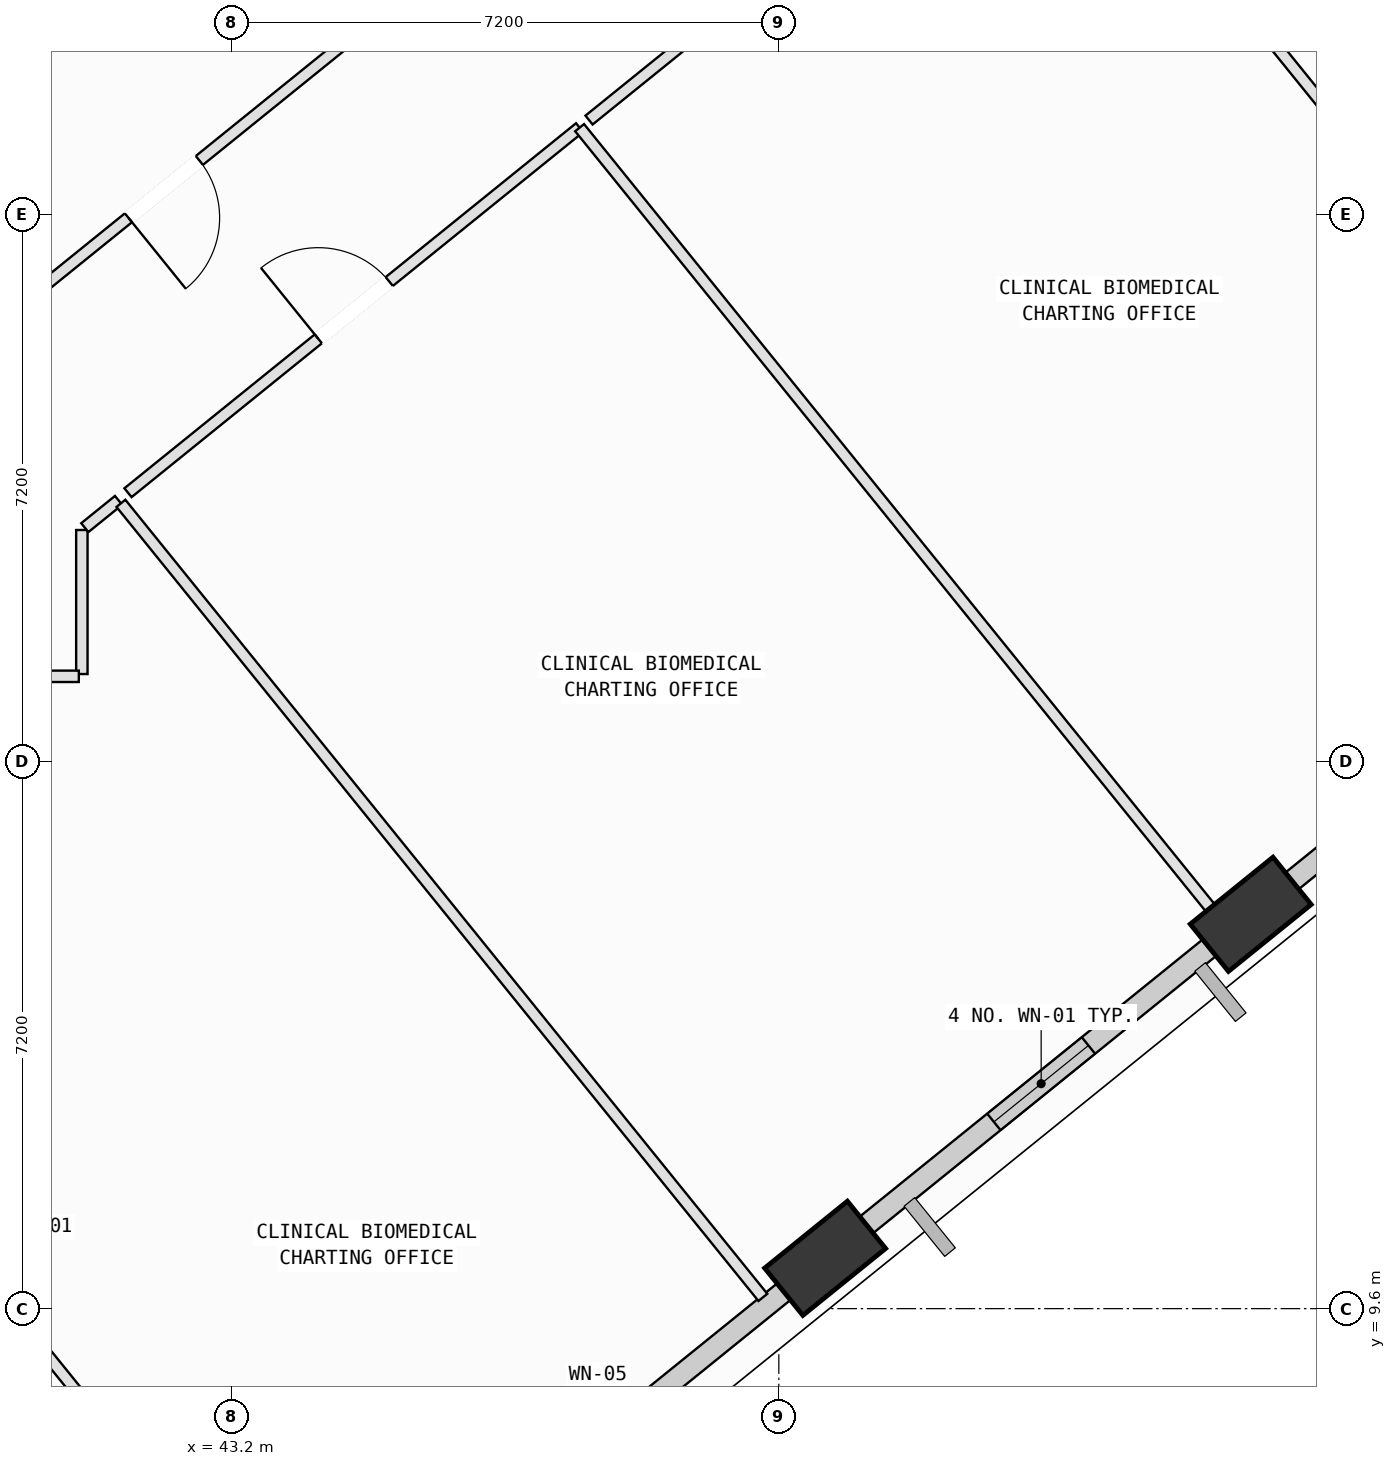
"""IFC4 building model, lengths in metres.
Left out: names, types, materials, properties, quantities, classifications, styles, units other than length and angle.
Written with IfcOpenShell. Run it as: python <this file> out.ifc"""

import sys

from ifc_helpers import new_model, si_unit, direction, frame, frame_2d, origin, origin_2d, place, context, subcontext, project, spatial, rectangle, extrude, element, fill, save


model = new_model("IFC4")
c1 = context("Model", 3, precision=1e-05, world=origin(), true_north=direction((0.0, 1.0)))
c2 = subcontext(c1, "Body", "Model", "MODEL_VIEW")
j1 = project(units=[si_unit("LENGTHUNIT", "METRE"), si_unit("PLANEANGLEUNIT", "RADIAN")], contexts=[c1])
p1 = place(None, origin())
s1 = spatial("IfcSite", under=j1, at=p1, CompositionType="ELEMENT")
p2 = place(p1, origin())
s2 = spatial("IfcBuilding", under=s1, at=p2, CompositionType="ELEMENT")
p3 = place(p2, frame((0.0, 0.0, 189.8)))
s3 = spatial("IfcBuildingStorey", under=s2, at=p3, CompositionType="ELEMENT", Elevation=189.8)
p4 = place(p3, frame((51.009, 10.262, 0.002), z_axis=(0.059363348955, 0.072318669987, 0.995613380169), x_axis=(-0.998222050572, 0.009656049796, 0.058817501262)))
e1 = element("IfcColumn", 1, at=p4, inside=s3, PredefinedType="COLUMN", context=c2, shape_type="SweptSolid", body=[
    extrude(rectangle(XDim=1.4, YDim=0.8, at=origin_2d()), origin(), (0.0, 0.0, 1.0), 4.014),
])
p5 = place(p3, frame((56.609, 14.789, 0.002), z_axis=(0.040468561583, 0.095155806966, 0.994639466301), x_axis=(-0.960371938901, -0.271035474756, 0.065003926005)))
e2 = element("IfcColumn", 2, at=p5, inside=s3, PredefinedType="COLUMN", context=c2, shape_type="SweptSolid", body=[
    extrude(rectangle(XDim=1.4, YDim=0.8, at=origin_2d()), origin(), (0.0, 0.0, 1.0), 4.018),
])
p6 = place(p3, frame((50.768, 10.067, 0.0), z_axis=(0.0, 0.0, 1.0), x_axis=(-0.777701603698, -0.628633609987, 0.0)))
e3 = element("IfcWall", 3, at=p6, inside=s3, PredefinedType="SOLIDWALL", context=c2, shape_type="SweptSolid", body=[
    extrude(rectangle(XDim=6.209, YDim=0.28, at=frame_2d((3.104, 0.0))), origin(), (0.0, 0.0, 1.0), 3.265),
])
p7 = place(p6, frame((2.934, 0.0, 0.75)))
e4 = element("IfcOpeningElement", 4, at=p7, cuts=e3, PredefinedType="OPENING", context=c2, shape_type="SweptSolid", body=[
    extrude(rectangle(XDim=1.2, YDim=1.75, at=frame_2d((0.6, 0.875))), frame((0.0, 0.15, 0.0), z_axis=(0.0, -1.0, 0.0), x_axis=(1.0, 0.0, 0.0)), (0.0, 0.0, 1.0), 0.3),
])
p8 = place(p3, frame((56.373, 14.598, 0.0), z_axis=(0.0, 0.0, 1.0), x_axis=(-0.77770639609, -0.628627681129, 0.0)))
e5 = element("IfcWall", 5, at=p8, inside=s3, PredefinedType="SOLIDWALL", context=c2, shape_type="SweptSolid", body=[
    extrude(rectangle(XDim=6.218, YDim=0.28, at=frame_2d((3.109, 0.0))), origin(), (0.0, 0.0, 1.0), 3.265),
])
p9 = place(p8, frame((2.442, 0.0, 0.75)))
e6 = element("IfcOpeningElement", 6, at=p9, cuts=e5, PredefinedType="OPENING", context=c2, shape_type="SweptSolid", body=[
    extrude(rectangle(XDim=1.6, YDim=1.95, at=frame_2d((0.8, 0.975))), frame((0.0, 0.15, 0.0), z_axis=(0.0, -1.0, 0.0), x_axis=(1.0, 0.0, 0.0)), (0.0, 0.0, 1.0), 0.3),
])
p10 = place(p3, frame((61.984, 19.134, 0.0), z_axis=(0.0, 0.0, 1.0), x_axis=(-0.777691861755, -0.628645661848, 0.0)))
e7 = element("IfcWall", 7, at=p10, inside=s3, PredefinedType="SOLIDWALL", context=c2, shape_type="SweptSolid", body=[
    extrude(rectangle(XDim=6.242, YDim=0.28, at=frame_2d((3.121, 0.0))), origin(), (0.0, 0.0, 1.0), 3.265),
])
p11 = place(p10, frame((0.668, 0.0, 0.75)))
e8 = element("IfcOpeningElement", 8, at=p11, cuts=e7, PredefinedType="OPENING", context=c2, shape_type="SweptSolid", body=[
    extrude(rectangle(XDim=2.0, YDim=1.95, at=frame_2d((1.0, 0.975))), frame((0.0, 0.15, 0.0), z_axis=(0.0, -1.0, 0.0), x_axis=(1.0, 0.0, 0.0)), (0.0, 0.0, 1.0), 0.3),
])
p12 = place(p3, frame((36.15, 14.71, 0.0), z_axis=(0.0, 0.0, 1.0), x_axis=(0.628634979592, -0.777700496613, 0.0)))
e9 = element("IfcWall", 9, at=p12, inside=s3, PredefinedType="PARTITIONING", context=c2, shape_type="SweptSolid", body=[
    extrude(rectangle(XDim=12.685, YDim=0.15, at=frame_2d((6.342, 0.0))), origin(), (0.0, 0.0, 1.0), 3.78),
])
p13 = place(p12, frame((5.912, 0.0, 0.0)))
e10 = element("IfcOpeningElement", 10, at=p13, cuts=e9, PredefinedType="OPENING", context=c2, shape_type="SweptSolid", body=[
    extrude(rectangle(XDim=0.86, YDim=2.06, at=frame_2d((0.43, 1.03))), frame((0.0, 0.085, 0.0), z_axis=(0.0, -1.0, 0.0), x_axis=(1.0, 0.0, 0.0)), (0.0, 0.0, 1.0), 0.17),
])
p14 = place(p3, frame((41.23, 17.95, 0.0), z_axis=(0.0, 0.0, 1.0), x_axis=(0.0, 1.0, 0.0)))
e11 = element("IfcWall", 11, at=p14, inside=s3, PredefinedType="PARTITIONING", context=c2, shape_type="SweptSolid", body=[
    extrude(rectangle(XDim=1.895, YDim=0.15, at=frame_2d((0.948, 0.0))), origin(), (0.0, 0.0, 1.0), 3.78),
])
p15 = place(p3, frame((41.269, 19.876, 0.0), z_axis=(0.0, 0.0, 1.0), x_axis=(0.777394219276, 0.629013694475, 0.0)))
e12 = element("IfcWall", 12, at=p15, inside=s3, PredefinedType="PARTITIONING", context=c2, shape_type="SweptSolid", body=[
    extrude(rectangle(XDim=0.571, YDim=0.15, at=frame_2d((0.286, 0.0))), origin(), (0.0, 0.0, 1.0), 3.065),
])
p16 = place(p3, frame((41.744, 20.196, 0.0), z_axis=(0.0, 0.0, 1.0), x_axis=(0.628664865479, -0.777676338146, 0.0)))
e13 = element("IfcWall", 13, at=p16, inside=s3, PredefinedType="PARTITIONING", context=c2, shape_type="SweptSolid", body=[
    extrude(rectangle(XDim=13.435, YDim=0.15, at=frame_2d((6.717, 0.0))), origin(), (0.0, 0.0, 1.0), 3.78),
])
p17 = place(p3, frame((38.899, 17.92, 0.0), z_axis=(0.0, 0.0, 1.0), x_axis=(1.0, 0.0, 0.0)))
e14 = element("IfcWall", 14, at=p17, inside=s3, PredefinedType="PARTITIONING", context=c2, shape_type="SweptSolid", body=[
    extrude(rectangle(XDim=2.291, YDim=0.15, at=frame_2d((1.146, 0.0))), origin(), (0.0, 0.0, 1.0), 3.78),
])
p18 = place(p3, frame((41.837, 20.336, 0.0), z_axis=(0.0, 0.0, 1.0), x_axis=(0.777713450533, 0.628618953628, 0.0)))
e15 = element("IfcWall", 15, at=p18, inside=s3, PredefinedType="PARTITIONING", context=c2, shape_type="SweptSolid", body=[
    extrude(rectangle(XDim=7.641, YDim=0.15, at=frame_2d((3.82, 0.0))), origin(), (0.0, 0.0, 1.0), 3.065),
])
p19 = place(p18, frame((3.22, 0.0, 0.0)))
e16 = element("IfcOpeningElement", 16, at=p19, cuts=e15, PredefinedType="OPENING", context=c2, shape_type="SweptSolid", body=[
    extrude(rectangle(XDim=1.2, YDim=2.15, at=frame_2d((0.6, 1.075))), frame((0.0, 0.085, 0.0), z_axis=(0.0, -1.0, 0.0), x_axis=(1.0, 0.0, 0.0)), (0.0, 0.0, 1.0), 0.17),
])
p20 = place(p3, frame((47.779, 25.139, 0.0), z_axis=(0.0, 0.0, 1.0), x_axis=(0.628603815075, -0.777725686649, 0.0)))
e17 = element("IfcWall", 17, at=p20, inside=s3, PredefinedType="PARTITIONING", context=c2, shape_type="SweptSolid", body=[
    extrude(rectangle(XDim=13.486, YDim=0.15, at=frame_2d((6.743, 0.0))), origin(), (0.0, 0.0, 1.0), 3.78),
])
p21 = place(p3, frame((51.682, 10.51, 0.0), z_axis=(0.0, 0.0, 1.0), x_axis=(-0.777778836383, -0.628538051095, 0.0)))
e18 = element("IfcWall", 18, at=p21, inside=s3, PredefinedType="PARTITIONING", context=c2, shape_type="SweptSolid", body=[
    extrude(rectangle(XDim=0.99, YDim=0.15, at=frame_2d((0.495, 0.0))), origin(), (0.0, 0.0, 1.0), 3.265),
])
p22 = place(p3, frame((47.903, 25.239, 0.0), z_axis=(0.0, 0.0, 1.0), x_axis=(0.777700823306, 0.628634575433, 0.0)))
e19 = element("IfcWall", 19, at=p22, inside=s3, PredefinedType="PARTITIONING", context=c2, shape_type="SweptSolid", body=[
    extrude(rectangle(XDim=7.64, YDim=0.15, at=frame_2d((3.82, 0.0))), origin(), (0.0, 0.0, 1.0), 3.78),
])
p23 = place(p22, frame((3.22, 0.0, 0.0)))
e20 = element("IfcOpeningElement", 20, at=p23, cuts=e19, PredefinedType="OPENING", context=c2, shape_type="SweptSolid", body=[
    extrude(rectangle(XDim=1.2, YDim=2.15, at=frame_2d((0.6, 1.075))), frame((0.0, 0.085, 0.0), z_axis=(0.0, -1.0, 0.0), x_axis=(1.0, 0.0, 0.0)), (0.0, 0.0, 1.0), 0.17),
])
p24 = place(p3, frame((53.845, 30.042, 0.0), z_axis=(0.0, 0.0, 1.0), x_axis=(0.628663319938, -0.777677587541, 0.0)))
e21 = element("IfcWall", 21, at=p24, inside=s3, PredefinedType="PARTITIONING", context=c2, shape_type="SweptSolid", body=[
    extrude(rectangle(XDim=13.83, YDim=0.15, at=frame_2d((6.915, 0.0))), origin(), (0.0, 0.0, 1.0), 3.78),
])
p25 = place(p3, frame((57.274, 15.031, 0.0), z_axis=(0.0, 0.0, 1.0), x_axis=(-0.777323313419, -0.629101316494, 0.0)))
e22 = element("IfcWall", 22, at=p25, inside=s3, PredefinedType="PARTITIONING", context=c2, shape_type="SweptSolid", body=[
    extrude(rectangle(XDim=0.87, YDim=0.15, at=frame_2d((0.435, 0.0))), origin(), (0.0, 0.0, 1.0), 3.265),
])
p26 = place(p3, frame((46.52, 27.734, 0.0), z_axis=(0.0, 0.0, 1.0), x_axis=(-0.777697805965, -0.628638308248, 0.0)))
e23 = element("IfcWall", 23, at=p26, inside=s3, PredefinedType="PARTITIONING", context=c2, shape_type="SweptSolid", body=[
    extrude(rectangle(XDim=10.828, YDim=0.15, at=frame_2d((5.414, 0.0))), origin(), (0.0, 0.0, 1.0), 3.065),
])
p27 = place(p26, frame((4.814, 0.0, 0.0)))
e24 = element("IfcOpeningElement", 24, at=p27, cuts=e23, PredefinedType="OPENING", context=c2, shape_type="SweptSolid", body=[
    extrude(rectangle(XDim=1.2, YDim=2.15, at=frame_2d((0.6, 1.075))), frame((0.0, 0.085, 0.0), z_axis=(0.0, -1.0, 0.0), x_axis=(1.0, 0.0, 0.0)), (0.0, 0.0, 1.0), 0.17),
])
p28 = place(p3, frame((34.93, 24.847, 0.0), z_axis=(0.0, 0.0, 1.0), x_axis=(0.777695693254, 0.628640921906, 0.0)))
e25 = element("IfcWall", 25, at=p28, inside=s3, PredefinedType="PARTITIONING", context=c2, shape_type="SweptSolid", body=[
    extrude(rectangle(XDim=10.828, YDim=0.15, at=frame_2d((5.414, 0.0))), origin(), (0.0, 0.0, 1.0), 3.265),
])
p29 = place(p3, frame((55.108, 31.153, 0.0), z_axis=(0.0, 0.0, 1.0), x_axis=(0.628641365164, -0.777695334951, 0.0)))
e26 = element("IfcWall", 26, at=p29, inside=s3, PredefinedType="PARTITIONING", context=c2, shape_type="SweptSolid", body=[
    extrude(rectangle(XDim=11.821, YDim=0.15, at=frame_2d((5.911, 0.0))), origin(), (0.0, 0.0, 1.0), 3.78),
])
p30 = place(p29, frame((5.48, 0.0, 0.0)))
e27 = element("IfcOpeningElement", 27, at=p30, cuts=e26, PredefinedType="OPENING", context=c2, shape_type="SweptSolid", body=[
    extrude(rectangle(XDim=0.86, YDim=2.06, at=frame_2d((0.43, 1.03))), frame((0.0, 0.085, 0.0), z_axis=(0.0, -1.0, 0.0), x_axis=(1.0, 0.0, 0.0)), (0.0, 0.0, 1.0), 0.17),
])
p31 = place(p3, frame((57.036, 32.712, 0.0), z_axis=(0.0, 0.0, 1.0), x_axis=(0.62868295639, -0.777661713308, 0.0)))
e28 = element("IfcWall", 28, at=p31, inside=s3, PredefinedType="PARTITIONING", context=c2, shape_type="SweptSolid", body=[
    extrude(rectangle(XDim=11.221, YDim=0.15, at=frame_2d((5.61, 0.0))), origin(), (0.0, 0.0, 1.0), 3.265),
])
p32 = place(p9, origin())
e29 = element("IfcWindow", 29, at=p32, inside=s3, PartitioningType="SINGLE_PANEL", PredefinedType="WINDOW", context=c2, shape_type="SweptSolid", body=[
    extrude(rectangle(XDim=1.6, YDim=1.95, at=frame_2d((0.8, 0.975))), frame((0.0, 0.03, 0.0), z_axis=(0.0, -1.0, 0.0), x_axis=(1.0, 0.0, 0.0)), (0.0, 0.0, 1.0), 0.06),
])
fill(e6, e29)
p33 = place(p19, origin())
e30 = element("IfcDoor", 30, at=p33, inside=s3, OperationType="SINGLE_SWING_LEFT", PredefinedType="DOOR", context=c2, shape_type="SweptSolid", body=[
    extrude(rectangle(XDim=1.2, YDim=2.15, at=frame_2d((0.6, 1.075))), frame((0.0, 0.025, 0.0), z_axis=(0.0, -1.0, 0.0), x_axis=(1.0, 0.0, 0.0)), (0.0, 0.0, 1.0), 0.05),
])
fill(e16, e30)
p34 = place(p27, origin())
e31 = element("IfcDoor", 31, at=p34, inside=s3, OperationType="SINGLE_SWING_RIGHT", PredefinedType="DOOR", context=c2, shape_type="SweptSolid", body=[
    extrude(rectangle(XDim=1.2, YDim=2.15, at=frame_2d((0.6, 1.075))), frame((0.0, 0.025, 0.0), z_axis=(0.0, -1.0, 0.0), x_axis=(1.0, 0.0, 0.0)), (0.0, 0.0, 1.0), 0.05),
])
fill(e24, e31)
save(model, sys.argv[1])
